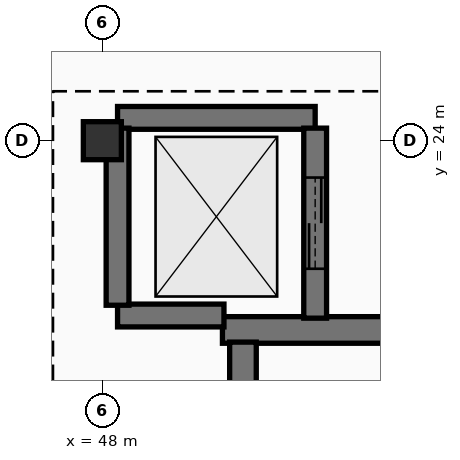
"""IFC4 building model, lengths in metres.
Left out: names, types, materials, properties, quantities, classifications, styles, units other than length and angle.
Written with IfcOpenShell. Run it as: python <this file> out.ifc"""

import sys

from ifc_helpers import new_model, si_unit, direction, frame, frame_2d, origin, origin_2d, place, context, subcontext, project, spatial, rectangle, extrude, element, fill, save


model = new_model("IFC4")
c1 = context("Model", 3, precision=1e-05, world=origin(), true_north=direction((0.0, 1.0)))
c2 = subcontext(c1, "Body", "Model", "MODEL_VIEW")
j1 = project(units=[si_unit("LENGTHUNIT", "METRE"), si_unit("PLANEANGLEUNIT", "RADIAN")], contexts=[c1])
p1 = place(None, origin())
s1 = spatial("IfcSite", under=j1, at=p1, CompositionType="ELEMENT")
p2 = place(p1, origin())
s2 = spatial("IfcBuilding", under=s1, at=p2, CompositionType="ELEMENT")
p3 = place(p2, frame((0.0, 0.0, -5.4)))
s3 = spatial("IfcBuildingStorey", under=s2, at=p3, CompositionType="ELEMENT", Elevation=-5.4)
p4 = place(p3, frame((48.0, 24.0, 0.0), z_axis=(0.0, 0.0, 1.0), x_axis=(1.0, 0.0, 0.0)))
e1 = element("IfcColumn", 1, at=p4, inside=s3, PredefinedType="COLUMN", context=c2, shape_type="SweptSolid", body=[
    extrude(rectangle(XDim=0.5, YDim=0.5, at=origin_2d()), origin(), (0.0, 0.0, 1.0), 5.4),
])
p5 = place(p3, frame((60.73, 21.51, 0.0), z_axis=(0.0, 0.0, 1.0), x_axis=(-1.0, 0.0, 0.0)))
e2 = element("IfcWall", 2, at=p5, inside=s3, PredefinedType="SHEAR", context=c2, shape_type="SweptSolid", body=[
    extrude(rectangle(XDim=11.15, YDim=0.35, at=frame_2d((5.575, 0.0))), origin(), (0.0, 0.0, 1.0), 5.09),
])
p6 = place(p3, frame((49.85, 21.35, 0.0), z_axis=(0.0, 0.0, 1.0), x_axis=(0.0, -1.0, 0.0)))
e3 = element("IfcWall", 3, at=p6, inside=s3, PredefinedType="SHEAR", context=c2, shape_type="SweptSolid", body=[
    extrude(rectangle(XDim=5.14, YDim=0.35, at=frame_2d((2.57, 0.0))), origin(), (0.0, 0.0, 1.0), 5.09),
])
p7 = place(p3, frame((50.8, 24.3, 0.0), z_axis=(0.0, 0.0, 1.0), x_axis=(-1.0, 0.0, 0.0)))
e4 = element("IfcWall", 4, at=p7, inside=s3, PredefinedType="SHEAR", context=c2, shape_type="SweptSolid", body=[
    extrude(rectangle(XDim=2.6, YDim=0.3, at=frame_2d((1.3, 0.0))), origin(), (0.0, 0.0, 1.0), 5.09),
])
p8 = place(p3, frame((48.2, 21.7, 0.0), z_axis=(0.0, 0.0, 1.0), x_axis=(1.0, 0.0, 0.0)))
e5 = element("IfcWall", 5, at=p8, inside=s3, PredefinedType="SHEAR", context=c2, shape_type="SweptSolid", body=[
    extrude(rectangle(XDim=1.4, YDim=0.3, at=frame_2d((0.7, 0.0))), origin(), (0.0, 0.0, 1.0), 5.09),
])
p9 = place(p3, frame((50.8, 21.665, 0.0), z_axis=(0.0, 0.0, 1.0), x_axis=(0.0, 1.0, 0.0)))
e6 = element("IfcWall", 6, at=p9, inside=s3, PredefinedType="SHEAR", context=c2, shape_type="SweptSolid", body=[
    extrude(rectangle(XDim=2.5, YDim=0.3, at=frame_2d((1.25, 0.0))), origin(), (0.0, 0.0, 1.0), 5.09),
])
p10 = place(p9, frame((0.65, 0.0, 0.0)))
e7 = element("IfcOpeningElement", 7, at=p10, cuts=e6, PredefinedType="OPENING", context=c2, shape_type="SweptSolid", body=[
    extrude(rectangle(XDim=1.2, YDim=2.2, at=frame_2d((0.6, 1.1))), frame((0.0, 0.16, 0.0), z_axis=(0.0, -1.0, 0.0), x_axis=(1.0, 0.0, 0.0)), (0.0, 0.0, 1.0), 0.32),
])
p11 = place(p3, frame((48.2, 24.165, 0.0), z_axis=(0.0, 0.0, 1.0), x_axis=(0.0, -1.0, 0.0)))
e8 = element("IfcWall", 8, at=p11, inside=s3, PredefinedType="SHEAR", context=c2, shape_type="SweptSolid", body=[
    extrude(rectangle(XDim=2.33, YDim=0.3, at=frame_2d((1.165, 0.0))), origin(), (0.0, 0.0, 1.0), 5.09),
])
p12 = place(p10, origin())
e9 = element("IfcDoor", 9, at=p12, inside=s3, OperationType="DOUBLE_DOOR_SLIDING", PredefinedType="DOOR", context=c2, shape_type="SweptSolid", body=[
    extrude(rectangle(XDim=1.2, YDim=2.2, at=frame_2d((0.6, 1.1))), frame((0.0, 0.025, 0.0), z_axis=(0.0, -1.0, 0.0), x_axis=(1.0, 0.0, 0.0)), (0.0, 0.0, 1.0), 0.05),
])
fill(e7, e9)
save(model, sys.argv[1])
